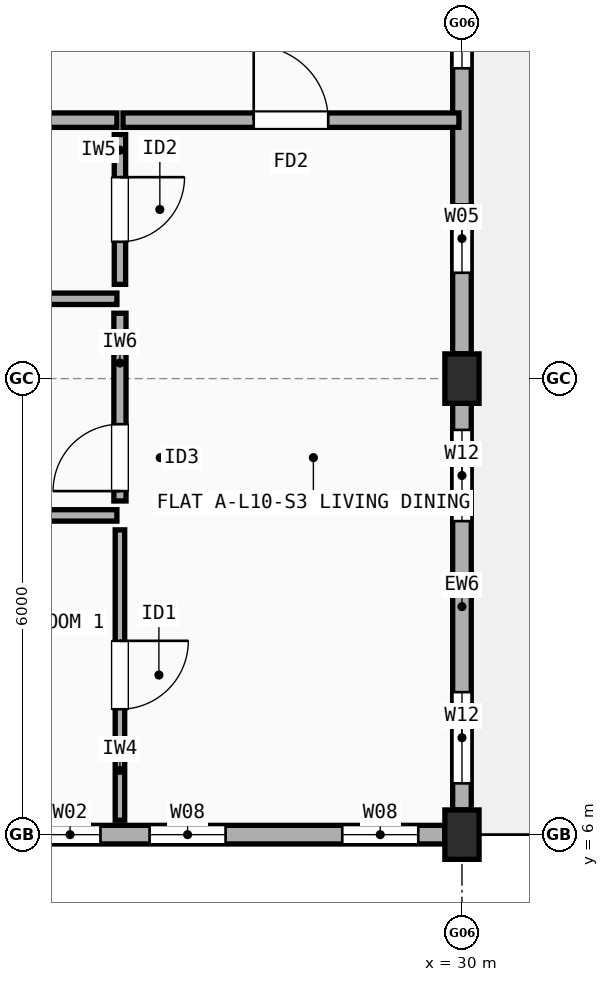
"""IFC4 building model, lengths in metres.
Left out: names, types, materials, properties, quantities, classifications, styles, units other than length and angle.
Written with IfcOpenShell. Run it as: python <this file> out.ifc"""

import sys

from ifc_helpers import new_model, si_unit, direction, frame, frame_2d, origin, origin_2d, place, context, subcontext, project, spatial, rectangle, extrude, element, fill, save


model = new_model("IFC4")
c1 = context("Model", 3, precision=1e-05, world=origin(), true_north=direction((0.0, 1.0)))
c2 = subcontext(c1, "Body", "Model", "MODEL_VIEW")
j1 = project(units=[si_unit("LENGTHUNIT", "METRE"), si_unit("PLANEANGLEUNIT", "RADIAN")], contexts=[c1])
p1 = place(None, origin())
s1 = spatial("IfcSite", under=j1, at=p1, CompositionType="ELEMENT")
p2 = place(p1, origin())
s2 = spatial("IfcBuilding", under=s1, at=p2, CompositionType="ELEMENT")
p3 = place(p2, frame((0.0, 0.0, 33.3)))
s3 = spatial("IfcBuildingStorey", under=s2, at=p3, CompositionType="ELEMENT", Elevation=33.3)
for number, where, z_axis, x_axis in (
    (1, (30.0, 6.0, 0.0), (0.0, 0.0, 1.0), (1.0, 0.0, 0.0)),
    (2, (30.0, 12.0, 0.0), (0.0, 0.0, 1.0), (1.0, 0.0, 0.0)),
):
    element("IfcColumn", number, at=place(p3, frame(where, z_axis=z_axis, x_axis=x_axis)), inside=s3, PredefinedType="COLUMN", context=c2, shape_type="SweptSolid", body=[
        extrude(rectangle(XDim=0.45, YDim=0.65, at=origin_2d()), origin(), (0.0, 0.0, 1.0), 2.99),
    ])
p4 = place(p3, frame((24.25, 6.0, 0.0), z_axis=(0.0, 0.0, 1.0), x_axis=(1.0, 0.0, 0.0)))
e3 = element("IfcWall", 3, at=p4, inside=s3, PredefinedType="STANDARD", context=c2, shape_type="SweptSolid", body=[
    extrude(rectangle(XDim=5.525, YDim=0.245, at=frame_2d((2.762, 0.0))), origin(), (0.0, 0.0, 1.0), 2.472),
])
p5 = place(p4, frame((1.64, 0.0, 0.9)))
e4 = element("IfcOpeningElement", 4, at=p5, cuts=e3, PredefinedType="OPENING", context=c2, shape_type="SweptSolid", body=[
    extrude(rectangle(XDim=1.0, YDim=1.4, at=frame_2d((0.5, 0.7))), frame((0.0, 0.133, 0.0), z_axis=(0.0, -1.0, 0.0), x_axis=(1.0, 0.0, 0.0)), (0.0, 0.0, 1.0), 0.265),
])
p6 = place(p4, frame((4.175, 0.0, 0.9)))
e5 = element("IfcOpeningElement", 5, at=p6, cuts=e3, PredefinedType="OPENING", context=c2, shape_type="SweptSolid", body=[
    extrude(rectangle(XDim=1.0, YDim=1.4, at=frame_2d((0.5, 0.7))), frame((0.0, 0.133, 0.0), z_axis=(0.0, -1.0, 0.0), x_axis=(1.0, 0.0, 0.0)), (0.0, 0.0, 1.0), 0.265),
])
p7 = place(p4, frame((0.194, 0.0, 0.9)))
e6 = element("IfcOpeningElement", 6, at=p7, cuts=e3, PredefinedType="OPENING", context=c2, shape_type="SweptSolid", body=[
    extrude(rectangle(XDim=0.8, YDim=1.2, at=frame_2d((0.4, 0.6))), frame((0.0, 0.133, 0.0), z_axis=(0.0, -1.0, 0.0), x_axis=(1.0, 0.0, 0.0)), (0.0, 0.0, 1.0), 0.265),
])
p8 = place(p3, frame((30.0, 6.325, 0.0), z_axis=(0.0, 0.0, 1.0), x_axis=(0.0, 1.0, 0.0)))
e7 = element("IfcWall", 7, at=p8, inside=s3, PredefinedType="STANDARD", context=c2, shape_type="SweptSolid", body=[
    extrude(rectangle(XDim=5.35, YDim=0.245, at=frame_2d((2.675, 0.0))), origin(), (0.0, 0.0, 1.0), 2.472),
])
p9 = place(p8, frame((0.35, 0.0, 0.9)))
e8 = element("IfcOpeningElement", 8, at=p9, cuts=e7, PredefinedType="OPENING", context=c2, shape_type="SweptSolid", body=[
    extrude(rectangle(XDim=1.2, YDim=1.35, at=frame_2d((0.6, 0.675))), frame((0.0, 0.133, 0.0), z_axis=(0.0, -1.0, 0.0), x_axis=(1.0, 0.0, 0.0)), (0.0, 0.0, 1.0), 0.265),
])
p10 = place(p8, frame((3.8, 0.0, 0.9)))
e9 = element("IfcOpeningElement", 9, at=p10, cuts=e7, PredefinedType="OPENING", context=c2, shape_type="SweptSolid", body=[
    extrude(rectangle(XDim=1.2, YDim=1.35, at=frame_2d((0.6, 0.675))), frame((0.0, 0.133, 0.0), z_axis=(0.0, -1.0, 0.0), x_axis=(1.0, 0.0, 0.0)), (0.0, 0.0, 1.0), 0.265),
])
p11 = place(p3, frame((30.0, 12.325, 0.0), z_axis=(0.0, 0.0, 1.0), x_axis=(0.0, 1.0, 0.0)))
e10 = element("IfcWall", 10, at=p11, inside=s3, PredefinedType="STANDARD", context=c2, shape_type="SweptSolid", body=[
    extrude(rectangle(XDim=5.35, YDim=0.245, at=frame_2d((2.675, 0.0))), origin(), (0.0, 0.0, 1.0), 2.472),
])
p12 = place(p11, frame((1.067, 0.0, 0.9)))
e11 = element("IfcOpeningElement", 11, at=p12, cuts=e10, PredefinedType="OPENING", context=c2, shape_type="SweptSolid", body=[
    extrude(rectangle(XDim=0.9, YDim=1.4, at=frame_2d((0.45, 0.7))), frame((0.0, 0.133, 0.0), z_axis=(0.0, -1.0, 0.0), x_axis=(1.0, 0.0, 0.0)), (0.0, 0.0, 1.0), 0.265),
])
p13 = place(p11, frame((3.758, 0.0, 0.9)))
e12 = element("IfcOpeningElement", 12, at=p13, cuts=e10, PredefinedType="OPENING", context=c2, shape_type="SweptSolid", body=[
    extrude(rectangle(XDim=0.95, YDim=1.35, at=frame_2d((0.475, 0.675))), frame((0.0, 0.133, 0.0), z_axis=(0.0, -1.0, 0.0), x_axis=(1.0, 0.0, 0.0)), (0.0, 0.0, 1.0), 0.265),
])
p14 = place(p3, frame((22.54, 15.4, 0.0), z_axis=(0.0, 0.0, 1.0), x_axis=(1.0, 0.0, 0.0)))
e13 = element("IfcWall", 13, at=p14, inside=s3, PredefinedType="SOLIDWALL", context=c2, shape_type="SweptSolid", body=[
    extrude(rectangle(XDim=2.92, YDim=0.19, at=frame_2d((1.46, 0.0))), origin(), (0.0, 0.0, 1.0), 2.508),
])
p15 = place(p3, frame((25.54, 15.4, 0.0), z_axis=(0.0, 0.0, 1.0), x_axis=(1.0, 0.0, 0.0)))
e14 = element("IfcWall", 14, at=p15, inside=s3, PredefinedType="SOLIDWALL", context=c2, shape_type="SweptSolid", body=[
    extrude(rectangle(XDim=4.42, YDim=0.19, at=frame_2d((2.21, 0.0))), origin(), (0.0, 0.0, 1.0), 2.472),
])
p16 = place(p15, frame((1.72, 0.0, 0.0)))
e15 = element("IfcOpeningElement", 15, at=p16, cuts=e14, PredefinedType="OPENING", context=c2, shape_type="SweptSolid", body=[
    extrude(rectangle(XDim=0.98, YDim=2.15, at=frame_2d((0.49, 1.075))), frame((0.0, 0.105, 0.0), z_axis=(0.0, -1.0, 0.0), x_axis=(1.0, 0.0, 0.0)), (0.0, 0.0, 1.0), 0.21),
])
p17 = place(p3, frame((25.5, 6.19, 0.0), z_axis=(0.0, 0.0, 1.0), x_axis=(0.0, 1.0, 0.0)))
e16 = element("IfcWall", 16, at=p17, inside=s3, PredefinedType="PARTITIONING", context=c2, shape_type="SweptSolid", body=[
    extrude(rectangle(XDim=3.82, YDim=0.125, at=frame_2d((1.91, 0.0))), origin(), (0.0, 0.0, 1.0), 2.99),
])
p18 = place(p17, frame((1.46, 0.0, 0.0)))
e17 = element("IfcOpeningElement", 17, at=p18, cuts=e16, PredefinedType="OPENING", context=c2, shape_type="SweptSolid", body=[
    extrude(rectangle(XDim=0.9, YDim=2.1, at=frame_2d((0.45, 1.05))), frame((0.0, 0.073, 0.0), z_axis=(0.0, -1.0, 0.0), x_axis=(1.0, 0.0, 0.0)), (0.0, 0.0, 1.0), 0.145),
])
p19 = place(p3, frame((25.5, 10.39, 0.0), z_axis=(0.0, 0.0, 1.0), x_axis=(0.0, 1.0, 0.0)))
e18 = element("IfcWall", 18, at=p19, inside=s3, PredefinedType="PLUMBINGWALL", context=c2, shape_type="SweptSolid", body=[
    extrude(rectangle(XDim=2.47, YDim=0.16, at=frame_2d((1.235, 0.0))), origin(), (0.0, 0.0, 1.0), 2.508),
])
p20 = place(p19, frame((0.13, 0.0, 0.0)))
e19 = element("IfcOpeningElement", 19, at=p20, cuts=e18, PredefinedType="OPENING", context=c2, shape_type="SweptSolid", body=[
    extrude(rectangle(XDim=0.88, YDim=2.1, at=frame_2d((0.44, 1.05))), frame((0.0, 0.09, 0.0), z_axis=(0.0, -1.0, 0.0), x_axis=(1.0, 0.0, 0.0)), (0.0, 0.0, 1.0), 0.18),
])
p21 = place(p3, frame((25.5, 13.24, 0.0), z_axis=(0.0, 0.0, 1.0), x_axis=(0.0, 1.0, 0.0)))
e20 = element("IfcWall", 20, at=p21, inside=s3, PredefinedType="PARTITIONING", context=c2, shape_type="SweptSolid", body=[
    extrude(rectangle(XDim=1.97, YDim=0.15, at=frame_2d((0.985, 0.0))), origin(), (0.0, 0.0, 1.0), 2.99),
])
p22 = place(p21, frame((0.56, 0.0, 0.0)))
e21 = element("IfcOpeningElement", 21, at=p22, cuts=e20, PredefinedType="OPENING", context=c2, shape_type="SweptSolid", body=[
    extrude(rectangle(XDim=0.85, YDim=2.1, at=frame_2d((0.425, 1.05))), frame((0.0, 0.085, 0.0), z_axis=(0.0, -1.0, 0.0), x_axis=(1.0, 0.0, 0.0)), (0.0, 0.0, 1.0), 0.17),
])
p23 = place(p3, frame((22.54, 10.2, 0.0), z_axis=(0.0, 0.0, 1.0), x_axis=(1.0, 0.0, 0.0)))
e22 = element("IfcWall", 22, at=p23, inside=s3, PredefinedType="PARTITIONING", context=c2, shape_type="SweptSolid", body=[
    extrude(rectangle(XDim=2.92, YDim=0.15, at=frame_2d((1.46, 0.0))), origin(), (0.0, 0.0, 1.0), 2.548),
])
p24 = place(p3, frame((22.54, 13.05, 0.0), z_axis=(0.0, 0.0, 1.0), x_axis=(1.0, 0.0, 0.0)))
e23 = element("IfcWall", 23, at=p24, inside=s3, PredefinedType="PARTITIONING", context=c2, shape_type="SweptSolid", body=[
    extrude(rectangle(XDim=2.92, YDim=0.15, at=frame_2d((1.46, 0.0))), origin(), (0.0, 0.0, 1.0), 2.508),
])
p25 = place(p5, origin())
e24 = element("IfcWindow", 24, at=p25, inside=s3, PartitioningType="SINGLE_PANEL", PredefinedType="WINDOW", context=c2, shape_type="SweptSolid", body=[
    extrude(rectangle(XDim=1.0, YDim=1.4, at=frame_2d((0.5, 0.7))), frame((0.0, 0.03, 0.0), z_axis=(0.0, -1.0, 0.0), x_axis=(1.0, 0.0, 0.0)), (0.0, 0.0, 1.0), 0.06),
])
fill(e4, e24)
p26 = place(p6, origin())
e25 = element("IfcWindow", 25, at=p26, inside=s3, PartitioningType="SINGLE_PANEL", PredefinedType="WINDOW", context=c2, shape_type="SweptSolid", body=[
    extrude(rectangle(XDim=1.0, YDim=1.4, at=frame_2d((0.5, 0.7))), frame((0.0, 0.03, 0.0), z_axis=(0.0, -1.0, 0.0), x_axis=(1.0, 0.0, 0.0)), (0.0, 0.0, 1.0), 0.06),
])
fill(e5, e25)
p27 = place(p9, origin())
e26 = element("IfcWindow", 26, at=p27, inside=s3, PartitioningType="SINGLE_PANEL", PredefinedType="WINDOW", context=c2, shape_type="SweptSolid", body=[
    extrude(rectangle(XDim=1.2, YDim=1.35, at=frame_2d((0.6, 0.675))), frame((0.0, 0.03, 0.0), z_axis=(0.0, -1.0, 0.0), x_axis=(1.0, 0.0, 0.0)), (0.0, 0.0, 1.0), 0.06),
])
fill(e8, e26)
p28 = place(p10, origin())
e27 = element("IfcWindow", 27, at=p28, inside=s3, PartitioningType="SINGLE_PANEL", PredefinedType="WINDOW", context=c2, shape_type="SweptSolid", body=[
    extrude(rectangle(XDim=1.2, YDim=1.35, at=frame_2d((0.6, 0.675))), frame((0.0, 0.03, 0.0), z_axis=(0.0, -1.0, 0.0), x_axis=(1.0, 0.0, 0.0)), (0.0, 0.0, 1.0), 0.06),
])
fill(e9, e27)
p29 = place(p12, origin())
e28 = element("IfcWindow", 28, at=p29, inside=s3, PartitioningType="SINGLE_PANEL", PredefinedType="WINDOW", context=c2, shape_type="SweptSolid", body=[
    extrude(rectangle(XDim=0.9, YDim=1.4, at=frame_2d((0.45, 0.7))), frame((0.0, 0.03, 0.0), z_axis=(0.0, -1.0, 0.0), x_axis=(1.0, 0.0, 0.0)), (0.0, 0.0, 1.0), 0.06),
])
fill(e11, e28)
p30 = place(p13, origin())
e29 = element("IfcWindow", 29, at=p30, inside=s3, PartitioningType="SINGLE_PANEL", PredefinedType="WINDOW", context=c2, shape_type="SweptSolid", body=[
    extrude(rectangle(XDim=0.95, YDim=1.35, at=frame_2d((0.475, 0.675))), frame((0.0, 0.03, 0.0), z_axis=(0.0, -1.0, 0.0), x_axis=(1.0, 0.0, 0.0)), (0.0, 0.0, 1.0), 0.06),
])
fill(e12, e29)
p31 = place(p7, origin())
e30 = element("IfcWindow", 30, at=p31, inside=s3, PartitioningType="SINGLE_PANEL", PredefinedType="WINDOW", context=c2, shape_type="SweptSolid", body=[
    extrude(rectangle(XDim=0.8, YDim=1.2, at=frame_2d((0.4, 0.6))), frame((0.0, 0.03, 0.0), z_axis=(0.0, -1.0, 0.0), x_axis=(1.0, 0.0, 0.0)), (0.0, 0.0, 1.0), 0.06),
])
fill(e6, e30)
p32 = place(p16, origin())
e31 = element("IfcDoor", 31, at=p32, inside=s3, OperationType="SINGLE_SWING_LEFT", PredefinedType="DOOR", context=c2, shape_type="SweptSolid", body=[
    extrude(rectangle(XDim=0.98, YDim=2.15, at=frame_2d((0.49, 1.075))), frame((0.0, 0.025, 0.0), z_axis=(0.0, -1.0, 0.0), x_axis=(1.0, 0.0, 0.0)), (0.0, 0.0, 1.0), 0.05),
])
fill(e15, e31)
p33 = place(p18, origin())
e32 = element("IfcDoor", 32, at=p33, inside=s3, OperationType="SINGLE_SWING_RIGHT", PredefinedType="DOOR", context=c2, shape_type="SweptSolid", body=[
    extrude(rectangle(XDim=0.9, YDim=2.1, at=frame_2d((0.45, 1.05))), frame((0.0, 0.025, 0.0), z_axis=(0.0, -1.0, 0.0), x_axis=(1.0, 0.0, 0.0)), (0.0, 0.0, 1.0), 0.05),
])
fill(e17, e32)
p34 = place(p20, origin())
e33 = element("IfcDoor", 33, at=p34, inside=s3, OperationType="SINGLE_SWING_LEFT", PredefinedType="DOOR", context=c2, shape_type="SweptSolid", body=[
    extrude(rectangle(XDim=0.88, YDim=2.1, at=frame_2d((0.44, 1.05))), frame((0.0, 0.025, 0.0), z_axis=(0.0, -1.0, 0.0), x_axis=(1.0, 0.0, 0.0)), (0.0, 0.0, 1.0), 0.05),
])
fill(e19, e33)
p35 = place(p22, origin())
e34 = element("IfcDoor", 34, at=p35, inside=s3, OperationType="SINGLE_SWING_RIGHT", PredefinedType="DOOR", context=c2, shape_type="SweptSolid", body=[
    extrude(rectangle(XDim=0.85, YDim=2.1, at=frame_2d((0.425, 1.05))), frame((0.0, 0.025, 0.0), z_axis=(0.0, -1.0, 0.0), x_axis=(1.0, 0.0, 0.0)), (0.0, 0.0, 1.0), 0.05),
])
fill(e21, e34)
save(model, sys.argv[1])
